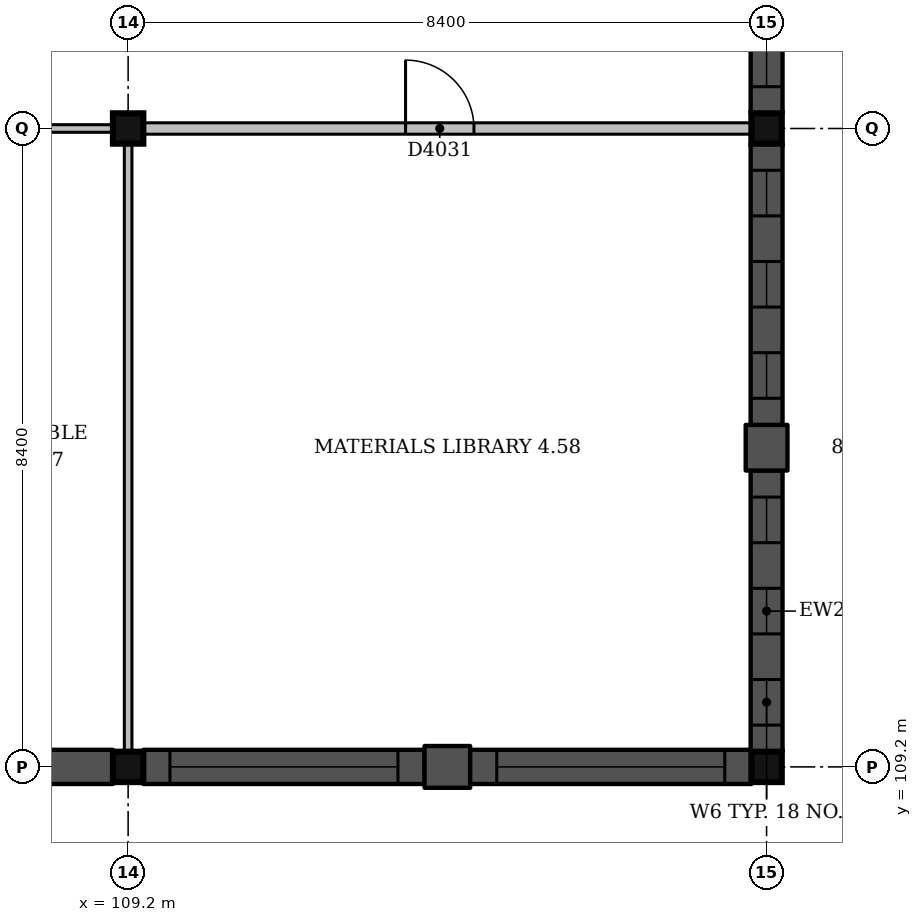
"""IFC4 building model, lengths in metres.
Left out: names, types, materials, properties, quantities, classifications, styles, units other than length and angle.
Written with IfcOpenShell. Run it as: python <this file> out.ifc"""

import sys

from ifc_helpers import new_model, si_unit, direction, frame, frame_2d, origin, origin_2d, place, context, subcontext, project, spatial, rectangle, extrude, element, fill, save


model = new_model("IFC4")
c1 = context("Model", 3, precision=1e-05, world=origin(), true_north=direction((0.0, 1.0)))
c2 = subcontext(c1, "Body", "Model", "MODEL_VIEW")
j1 = project(units=[si_unit("LENGTHUNIT", "METRE"), si_unit("PLANEANGLEUNIT", "RADIAN")], contexts=[c1])
p1 = place(None, origin())
s1 = spatial("IfcSite", under=j1, at=p1, CompositionType="ELEMENT")
p2 = place(p1, origin())
s2 = spatial("IfcBuilding", under=s1, at=p2, CompositionType="ELEMENT")
p3 = place(p2, frame((0.0, 0.0, 18.0)))
s3 = spatial("IfcBuildingStorey", under=s2, at=p3, CompositionType="ELEMENT", Elevation=18.0)
for number, where, z_axis, x_axis in (
    (1, (109.2, 109.2, 0.0), (0.0, 0.0, 1.0), (1.0, 0.0, 0.0)),
    (2, (109.2, 117.6, 0.0), (0.0, 0.0, 1.0), (1.0, 0.0, 0.0)),
    (3, (117.6, 109.2, 0.0), (0.0, 0.0, 1.0), (1.0, 0.0, 0.0)),
    (4, (117.6, 117.6, 0.0), (0.0, 0.0, 1.0), (1.0, 0.0, 0.0)),
):
    element("IfcColumn", number, at=place(p3, frame(where, z_axis=z_axis, x_axis=x_axis)), inside=s3, PredefinedType="COLUMN", context=c2, shape_type="SweptSolid", body=[
        extrude(rectangle(XDim=0.4, YDim=0.4, at=origin_2d()), origin(), (0.0, 0.0, 1.0), 4.5),
    ])
p4 = place(p3, frame((105.3, 109.2, 0.0), z_axis=(0.0, 0.0, 1.0), x_axis=(1.0, 0.0, 0.0)))
e5 = element("IfcWall", 5, at=p4, inside=s3, PredefinedType="SOLIDWALL", context=c2, shape_type="SweptSolid", body=[
    extrude(rectangle(XDim=3.7, YDim=0.45, at=frame_2d((1.85, 0.0))), origin(), (0.0, 0.0, 1.0), 3.45),
])
p5 = place(p4, frame((1.55, 0.0, 1.5)))
e6 = element("IfcOpeningElement", 6, at=p5, cuts=e5, PredefinedType="OPENING", context=c2, shape_type="SweptSolid", body=[
    extrude(rectangle(XDim=0.6, YDim=1.2, at=frame_2d((0.3, 0.6))), frame((0.0, 0.235, 0.0), z_axis=(0.0, -1.0, 0.0), x_axis=(1.0, 0.0, 0.0)), (0.0, 0.0, 1.0), 0.47),
])
p6 = place(p3, frame((109.4, 109.2, 0.0), z_axis=(0.0, 0.0, 1.0), x_axis=(1.0, 0.0, 0.0)))
e7 = element("IfcWall", 7, at=p6, inside=s3, PredefinedType="SOLIDWALL", context=c2, shape_type="SweptSolid", body=[
    extrude(rectangle(XDim=3.7, YDim=0.45, at=frame_2d((1.85, 0.0))), origin(), (0.0, 0.0, 1.0), 3.45),
])
p7 = place(p6, frame((0.35, 0.0, 0.9)))
e8 = element("IfcOpeningElement", 8, at=p7, cuts=e7, PredefinedType="OPENING", context=c2, shape_type="SweptSolid", body=[
    extrude(rectangle(XDim=3.0, YDim=2.1, at=frame_2d((1.5, 1.05))), frame((0.0, 0.235, 0.0), z_axis=(0.0, -1.0, 0.0), x_axis=(1.0, 0.0, 0.0)), (0.0, 0.0, 1.0), 0.47),
])
p8 = place(p3, frame((113.1, 109.2, 0.0), z_axis=(0.0, 0.0, 1.0), x_axis=(1.0, 0.0, 0.0)))
e9 = element("IfcWall", 9, at=p8, inside=s3, PredefinedType="SOLIDWALL", context=c2, shape_type="SweptSolid", body=[
    extrude(rectangle(XDim=0.6, YDim=0.55, at=frame_2d((0.3, 0.0))), origin(), (0.0, 0.0, 1.0), 3.45),
])
p9 = place(p3, frame((113.7, 109.2, 0.0), z_axis=(0.0, 0.0, 1.0), x_axis=(1.0, 0.0, 0.0)))
e10 = element("IfcWall", 10, at=p9, inside=s3, PredefinedType="SOLIDWALL", context=c2, shape_type="SweptSolid", body=[
    extrude(rectangle(XDim=3.7, YDim=0.45, at=frame_2d((1.85, 0.0))), origin(), (0.0, 0.0, 1.0), 3.45),
])
p10 = place(p9, frame((0.35, 0.0, 0.9)))
e11 = element("IfcOpeningElement", 11, at=p10, cuts=e10, PredefinedType="OPENING", context=c2, shape_type="SweptSolid", body=[
    extrude(rectangle(XDim=3.0, YDim=2.1, at=frame_2d((1.5, 1.05))), frame((0.0, 0.235, 0.0), z_axis=(0.0, -1.0, 0.0), x_axis=(1.0, 0.0, 0.0)), (0.0, 0.0, 1.0), 0.47),
])
p11 = place(p3, frame((117.6, 109.4, 0.0), z_axis=(0.0, 0.0, 1.0), x_axis=(0.0, 1.0, 0.0)))
e12 = element("IfcWall", 12, at=p11, inside=s3, PredefinedType="SOLIDWALL", context=c2, shape_type="SweptSolid", body=[
    extrude(rectangle(XDim=3.7, YDim=0.42, at=frame_2d((1.85, 0.0))), origin(), (0.0, 0.0, 1.0), 4.2),
])
p12 = place(p11, frame((0.35, 0.0, 1.0)))
e13 = element("IfcOpeningElement", 13, at=p12, cuts=e12, PredefinedType="OPENING", context=c2, shape_type="SweptSolid", body=[
    extrude(rectangle(XDim=0.6, YDim=2.1, at=frame_2d((0.3, 1.05))), frame((0.0, 0.22, 0.0), z_axis=(0.0, -1.0, 0.0), x_axis=(1.0, 0.0, 0.0)), (0.0, 0.0, 1.0), 0.44),
])
p13 = place(p11, frame((1.55, 0.0, 1.0)))
e14 = element("IfcOpeningElement", 14, at=p13, cuts=e12, PredefinedType="OPENING", context=c2, shape_type="SweptSolid", body=[
    extrude(rectangle(XDim=0.6, YDim=2.1, at=frame_2d((0.3, 1.05))), frame((0.0, 0.22, 0.0), z_axis=(0.0, -1.0, 0.0), x_axis=(1.0, 0.0, 0.0)), (0.0, 0.0, 1.0), 0.44),
])
p14 = place(p11, frame((2.75, 0.0, 1.0)))
e15 = element("IfcOpeningElement", 15, at=p14, cuts=e12, PredefinedType="OPENING", context=c2, shape_type="SweptSolid", body=[
    extrude(rectangle(XDim=0.6, YDim=2.1, at=frame_2d((0.3, 1.05))), frame((0.0, 0.22, 0.0), z_axis=(0.0, -1.0, 0.0), x_axis=(1.0, 0.0, 0.0)), (0.0, 0.0, 1.0), 0.44),
])
p15 = place(p3, frame((117.6, 113.1, 0.0), z_axis=(0.0, 0.0, 1.0), x_axis=(0.0, 1.0, 0.0)))
e16 = element("IfcWall", 16, at=p15, inside=s3, PredefinedType="SOLIDWALL", context=c2, shape_type="SweptSolid", body=[
    extrude(rectangle(XDim=0.6, YDim=0.55, at=frame_2d((0.3, 0.0))), origin(), (0.0, 0.0, 1.0), 4.2),
])
p16 = place(p3, frame((117.6, 113.7, 0.0), z_axis=(0.0, 0.0, 1.0), x_axis=(0.0, 1.0, 0.0)))
e17 = element("IfcWall", 17, at=p16, inside=s3, PredefinedType="SOLIDWALL", context=c2, shape_type="SweptSolid", body=[
    extrude(rectangle(XDim=3.7, YDim=0.42, at=frame_2d((1.85, 0.0))), origin(), (0.0, 0.0, 1.0), 4.2),
])
p17 = place(p16, frame((0.35, 0.0, 1.0)))
e18 = element("IfcOpeningElement", 18, at=p17, cuts=e17, PredefinedType="OPENING", context=c2, shape_type="SweptSolid", body=[
    extrude(rectangle(XDim=0.6, YDim=2.1, at=frame_2d((0.3, 1.05))), frame((0.0, 0.22, 0.0), z_axis=(0.0, -1.0, 0.0), x_axis=(1.0, 0.0, 0.0)), (0.0, 0.0, 1.0), 0.44),
])
p18 = place(p16, frame((1.55, 0.0, 1.0)))
e19 = element("IfcOpeningElement", 19, at=p18, cuts=e17, PredefinedType="OPENING", context=c2, shape_type="SweptSolid", body=[
    extrude(rectangle(XDim=0.6, YDim=2.1, at=frame_2d((0.3, 1.05))), frame((0.0, 0.22, 0.0), z_axis=(0.0, -1.0, 0.0), x_axis=(1.0, 0.0, 0.0)), (0.0, 0.0, 1.0), 0.44),
])
p19 = place(p16, frame((2.75, 0.0, 1.0)))
e20 = element("IfcOpeningElement", 20, at=p19, cuts=e17, PredefinedType="OPENING", context=c2, shape_type="SweptSolid", body=[
    extrude(rectangle(XDim=0.6, YDim=2.1, at=frame_2d((0.3, 1.05))), frame((0.0, 0.22, 0.0), z_axis=(0.0, -1.0, 0.0), x_axis=(1.0, 0.0, 0.0)), (0.0, 0.0, 1.0), 0.44),
])
p20 = place(p3, frame((117.6, 117.8, 0.0), z_axis=(0.0, 0.0, 1.0), x_axis=(0.0, 1.0, 0.0)))
e21 = element("IfcWall", 21, at=p20, inside=s3, PredefinedType="SOLIDWALL", context=c2, shape_type="SweptSolid", body=[
    extrude(rectangle(XDim=3.7, YDim=0.42, at=frame_2d((1.85, 0.0))), origin(), (0.0, 0.0, 1.0), 3.45),
])
p21 = place(p20, frame((0.35, 0.0, 1.0)))
e22 = element("IfcOpeningElement", 22, at=p21, cuts=e21, PredefinedType="OPENING", context=c2, shape_type="SweptSolid", body=[
    extrude(rectangle(XDim=0.6, YDim=2.1, at=frame_2d((0.3, 1.05))), frame((0.0, 0.22, 0.0), z_axis=(0.0, -1.0, 0.0), x_axis=(1.0, 0.0, 0.0)), (0.0, 0.0, 1.0), 0.44),
])
p22 = place(p20, frame((1.55, 0.0, 1.0)))
e23 = element("IfcOpeningElement", 23, at=p22, cuts=e21, PredefinedType="OPENING", context=c2, shape_type="SweptSolid", body=[
    extrude(rectangle(XDim=0.6, YDim=2.1, at=frame_2d((0.3, 1.05))), frame((0.0, 0.22, 0.0), z_axis=(0.0, -1.0, 0.0), x_axis=(1.0, 0.0, 0.0)), (0.0, 0.0, 1.0), 0.44),
])
p23 = place(p20, frame((2.75, 0.0, 1.0)))
e24 = element("IfcOpeningElement", 24, at=p23, cuts=e21, PredefinedType="OPENING", context=c2, shape_type="SweptSolid", body=[
    extrude(rectangle(XDim=0.6, YDim=2.1, at=frame_2d((0.3, 1.05))), frame((0.0, 0.22, 0.0), z_axis=(0.0, -1.0, 0.0), x_axis=(1.0, 0.0, 0.0)), (0.0, 0.0, 1.0), 0.44),
])
p24 = place(p3, frame((109.4, 117.6, 0.0), z_axis=(0.0, 0.0, 1.0), x_axis=(1.0, 0.0, 0.0)))
e25 = element("IfcWall", 25, at=p24, inside=s3, PredefinedType="PARTITIONING", context=c2, shape_type="SweptSolid", body=[
    extrude(rectangle(XDim=8.0, YDim=0.15, at=frame_2d((4.0, 0.0))), origin(), (0.0, 0.0, 1.0), 3.5),
])
p25 = place(p24, frame((3.45, 0.0, 0.0)))
e26 = element("IfcOpeningElement", 26, at=p25, cuts=e25, PredefinedType="OPENING", context=c2, shape_type="SweptSolid", body=[
    extrude(rectangle(XDim=0.9, YDim=2.1, at=frame_2d((0.45, 1.05))), frame((0.0, 0.085, 0.0), z_axis=(0.0, -1.0, 0.0), x_axis=(1.0, 0.0, 0.0)), (0.0, 0.0, 1.0), 0.17),
])
p26 = place(p3, frame((101.0, 117.6, 0.0), z_axis=(0.0, 0.0, 1.0), x_axis=(1.0, 0.0, 0.0)))
e27 = element("IfcWall", 27, at=p26, inside=s3, PredefinedType="PARTITIONING", context=c2, shape_type="SweptSolid", body=[
    extrude(rectangle(XDim=8.0, YDim=0.1, at=frame_2d((4.0, 0.0))), origin(), (0.0, 0.0, 1.0), 3.5),
])
p27 = place(p26, frame((2.9, 0.0, 0.0)))
e28 = element("IfcOpeningElement", 28, at=p27, cuts=e27, PredefinedType="OPENING", context=c2, shape_type="SweptSolid", body=[
    extrude(rectangle(XDim=0.9, YDim=2.1, at=frame_2d((0.45, 1.05))), frame((0.0, 0.06, 0.0), z_axis=(0.0, -1.0, 0.0), x_axis=(1.0, 0.0, 0.0)), (0.0, 0.0, 1.0), 0.12),
])
p28 = place(p26, frame((6.05, 0.0, 0.0)))
e29 = element("IfcOpeningElement", 29, at=p28, cuts=e27, PredefinedType="OPENING", context=c2, shape_type="SweptSolid", body=[
    extrude(rectangle(XDim=1.0, YDim=2.1, at=frame_2d((0.5, 1.05))), frame((0.0, 0.06, 0.0), z_axis=(0.0, -1.0, 0.0), x_axis=(1.0, 0.0, 0.0)), (0.0, 0.0, 1.0), 0.12),
])
p29 = place(p3, frame((109.2, 109.4, 0.0), z_axis=(0.0, 0.0, 1.0), x_axis=(0.0, 1.0, 0.0)))
e30 = element("IfcWall", 30, at=p29, inside=s3, PredefinedType="PARTITIONING", context=c2, shape_type="SweptSolid", body=[
    extrude(rectangle(XDim=8.0, YDim=0.1, at=frame_2d((4.0, 0.0))), origin(), (0.0, 0.0, 1.0), 4.15),
])
p30 = place(p7, origin())
e31 = element("IfcWindow", 31, at=p30, inside=s3, PartitioningType="SINGLE_PANEL", PredefinedType="WINDOW", context=c2, shape_type="SweptSolid", body=[
    extrude(rectangle(XDim=3.0, YDim=2.1, at=frame_2d((1.5, 1.05))), frame((0.0, 0.135, 0.0), z_axis=(0.0, -1.0, 0.0), x_axis=(1.0, 0.0, 0.0)), (0.0, 0.0, 1.0), 0.06),
])
fill(e8, e31)
p31 = place(p10, origin())
e32 = element("IfcWindow", 32, at=p31, inside=s3, PartitioningType="SINGLE_PANEL", PredefinedType="WINDOW", context=c2, shape_type="SweptSolid", body=[
    extrude(rectangle(XDim=3.0, YDim=2.1, at=frame_2d((1.5, 1.05))), frame((0.0, 0.135, 0.0), z_axis=(0.0, -1.0, 0.0), x_axis=(1.0, 0.0, 0.0)), (0.0, 0.0, 1.0), 0.06),
])
fill(e11, e32)
p32 = place(p12, origin())
e33 = element("IfcWindow", 33, at=p32, inside=s3, PartitioningType="SINGLE_PANEL", PredefinedType="WINDOW", context=c2, shape_type="SweptSolid", body=[
    extrude(rectangle(XDim=0.6, YDim=2.1, at=frame_2d((0.3, 1.05))), frame((0.0, 0.15, 0.0), z_axis=(0.0, -1.0, 0.0), x_axis=(1.0, 0.0, 0.0)), (0.0, 0.0, 1.0), 0.06),
])
fill(e13, e33)
p33 = place(p13, origin())
e34 = element("IfcWindow", 34, at=p33, inside=s3, PartitioningType="SINGLE_PANEL", PredefinedType="WINDOW", context=c2, shape_type="SweptSolid", body=[
    extrude(rectangle(XDim=0.6, YDim=2.1, at=frame_2d((0.3, 1.05))), frame((0.0, 0.15, 0.0), z_axis=(0.0, -1.0, 0.0), x_axis=(1.0, 0.0, 0.0)), (0.0, 0.0, 1.0), 0.06),
])
fill(e14, e34)
p34 = place(p14, origin())
e35 = element("IfcWindow", 35, at=p34, inside=s3, PartitioningType="SINGLE_PANEL", PredefinedType="WINDOW", context=c2, shape_type="SweptSolid", body=[
    extrude(rectangle(XDim=0.6, YDim=2.1, at=frame_2d((0.3, 1.05))), frame((0.0, 0.15, 0.0), z_axis=(0.0, -1.0, 0.0), x_axis=(1.0, 0.0, 0.0)), (0.0, 0.0, 1.0), 0.06),
])
fill(e15, e35)
p35 = place(p17, origin())
e36 = element("IfcWindow", 36, at=p35, inside=s3, PartitioningType="SINGLE_PANEL", PredefinedType="WINDOW", context=c2, shape_type="SweptSolid", body=[
    extrude(rectangle(XDim=0.6, YDim=2.1, at=frame_2d((0.3, 1.05))), frame((0.0, 0.15, 0.0), z_axis=(0.0, -1.0, 0.0), x_axis=(1.0, 0.0, 0.0)), (0.0, 0.0, 1.0), 0.06),
])
fill(e18, e36)
p36 = place(p18, origin())
e37 = element("IfcWindow", 37, at=p36, inside=s3, PartitioningType="SINGLE_PANEL", PredefinedType="WINDOW", context=c2, shape_type="SweptSolid", body=[
    extrude(rectangle(XDim=0.6, YDim=2.1, at=frame_2d((0.3, 1.05))), frame((0.0, 0.15, 0.0), z_axis=(0.0, -1.0, 0.0), x_axis=(1.0, 0.0, 0.0)), (0.0, 0.0, 1.0), 0.06),
])
fill(e19, e37)
p37 = place(p19, origin())
e38 = element("IfcWindow", 38, at=p37, inside=s3, PartitioningType="SINGLE_PANEL", PredefinedType="WINDOW", context=c2, shape_type="SweptSolid", body=[
    extrude(rectangle(XDim=0.6, YDim=2.1, at=frame_2d((0.3, 1.05))), frame((0.0, 0.15, 0.0), z_axis=(0.0, -1.0, 0.0), x_axis=(1.0, 0.0, 0.0)), (0.0, 0.0, 1.0), 0.06),
])
fill(e20, e38)
p38 = place(p21, origin())
e39 = element("IfcWindow", 39, at=p38, inside=s3, PartitioningType="SINGLE_PANEL", PredefinedType="WINDOW", context=c2, shape_type="SweptSolid", body=[
    extrude(rectangle(XDim=0.6, YDim=2.1, at=frame_2d((0.3, 1.05))), frame((0.0, 0.15, 0.0), z_axis=(0.0, -1.0, 0.0), x_axis=(1.0, 0.0, 0.0)), (0.0, 0.0, 1.0), 0.06),
])
fill(e22, e39)
p39 = place(p25, origin())
e40 = element("IfcDoor", 40, at=p39, inside=s3, OperationType="SINGLE_SWING_LEFT", PredefinedType="DOOR", context=c2, shape_type="SweptSolid", body=[
    extrude(rectangle(XDim=0.9, YDim=2.1, at=frame_2d((0.45, 1.05))), frame((0.0, 0.025, 0.0), z_axis=(0.0, -1.0, 0.0), x_axis=(1.0, 0.0, 0.0)), (0.0, 0.0, 1.0), 0.05),
])
fill(e26, e40)
save(model, sys.argv[1])
